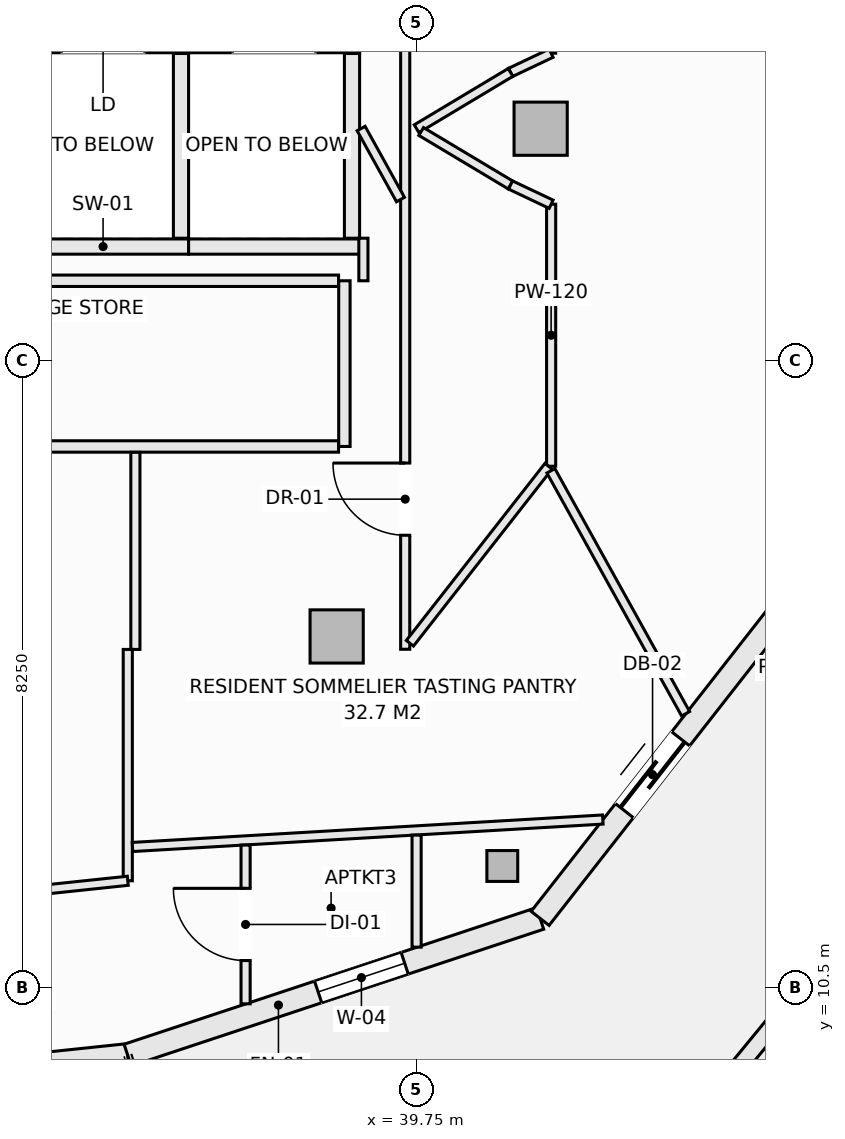
"""IFC4 building model, lengths in metres.
Left out: names, types, materials, properties, quantities, classifications, styles, units other than length and angle.
Written with IfcOpenShell. Run it as: python <this file> out.ifc"""

import sys

from ifc_helpers import new_model, si_unit, direction, frame, frame_2d, origin, origin_2d, place, context, subcontext, project, spatial, rectangle, hollow_rectangle, extrude, element, fill, save


model = new_model("IFC4")
c1 = context("Model", 3, precision=1e-05, world=origin(), true_north=direction((0.0, 1.0)))
c2 = subcontext(c1, "Body", "Model", "MODEL_VIEW")
j1 = project(units=[si_unit("LENGTHUNIT", "METRE"), si_unit("PLANEANGLEUNIT", "RADIAN")], contexts=[c1])
p1 = place(None, origin())
s1 = spatial("IfcSite", under=j1, at=p1, CompositionType="ELEMENT")
p2 = place(p1, origin())
s2 = spatial("IfcBuilding", under=s1, at=p2, CompositionType="ELEMENT")
p3 = place(p2, frame((0.0, 0.0, 242.6)))
s3 = spatial("IfcBuildingStorey", under=s2, at=p3, CompositionType="ELEMENT", Elevation=242.6)
p4 = place(p3, frame((40.878, 12.101, -0.27), z_axis=(0.0, 0.0, 1.0), x_axis=(1.0, 0.0, 0.0)))
e1 = element("IfcColumn", 1, at=p4, inside=s3, PredefinedType="COLUMN", context=c2, shape_type="SweptSolid", body=[
    extrude(hollow_rectangle(XDim=0.406, YDim=0.406, WallThickness=0.016, at=origin_2d()), origin(), (0.0, 0.0, 1.0), 3.3),
])
for number, where, z_axis, x_axis in (
    (2, (38.698, 15.121, -0.27), (0.0, 0.0, 1.0), (1.0, 0.0, 0.0)),
    (3, (41.382, 21.801, -0.27), (0.0, 0.0, 1.0), (1.0, 0.0, 0.0)),
):
    element("IfcColumn", number, at=place(p3, frame(where, z_axis=z_axis, x_axis=x_axis)), inside=s3, PredefinedType="COLUMN", context=c2, shape_type="SweptSolid", body=[
        extrude(rectangle(XDim=0.7, YDim=0.7, at=origin_2d()), origin(), (0.0, 0.0, 1.0), 3.3),
    ])
p5 = place(p3, frame((30.125, 9.0, 0.0), z_axis=(0.0, 0.0, 1.0), x_axis=(0.994500425783, 0.10473253132, 0.0)))
e4 = element("IfcWall", 4, at=p5, inside=s3, PredefinedType="SOLIDWALL", context=c2, shape_type="SweptSolid", body=[
    extrude(rectangle(XDim=5.856, YDim=0.3, at=frame_2d((2.928, 0.0))), origin(), (0.0, 0.0, 1.0), 2.605),
])
p6 = place(p5, frame((1.828, 0.0, 0.72)))
e5 = element("IfcOpeningElement", 5, at=p6, cuts=e4, PredefinedType="OPENING", context=c2, shape_type="SweptSolid", body=[
    extrude(rectangle(XDim=2.2, YDim=1.65, at=frame_2d((1.1, 0.825))), frame((0.0, 0.16, 0.0), z_axis=(0.0, -1.0, 0.0), x_axis=(1.0, 0.0, 0.0)), (0.0, 0.0, 1.0), 0.32),
])
p7 = place(p3, frame((35.948, 9.613, 0.0), z_axis=(0.0, 0.0, 1.0), x_axis=(0.949232769585, 0.314574552605, 0.0)))
e6 = element("IfcWall", 6, at=p7, inside=s3, PredefinedType="SOLIDWALL", context=c2, shape_type="SweptSolid", body=[
    extrude(rectangle(XDim=5.717, YDim=0.3, at=frame_2d((2.858, 0.0))), origin(), (0.0, 0.0, 1.0), 2.605),
])
p8 = place(p7, frame((2.64, 0.0, 0.72)))
e7 = element("IfcOpeningElement", 7, at=p8, cuts=e6, PredefinedType="OPENING", context=c2, shape_type="SweptSolid", body=[
    extrude(rectangle(XDim=1.2, YDim=1.65, at=frame_2d((0.6, 0.825))), frame((0.0, 0.16, 0.0), z_axis=(0.0, -1.0, 0.0), x_axis=(1.0, 0.0, 0.0)), (0.0, 0.0, 1.0), 0.32),
])
p9 = place(p3, frame((41.375, 11.412, 0.0), z_axis=(0.0, 0.0, 1.0), x_axis=(0.61644588519, 0.787397276241, 0.0)))
e8 = element("IfcWall", 8, at=p9, inside=s3, PredefinedType="SOLIDWALL", context=c2, shape_type="SweptSolid", body=[
    extrude(rectangle(XDim=5.357, YDim=0.3, at=frame_2d((2.678, 0.0))), origin(), (0.0, 0.0, 1.0), 2.605),
])
p10 = place(p9, frame((1.8, 0.0, 0.0)))
e9 = element("IfcOpeningElement", 9, at=p10, cuts=e8, PredefinedType="OPENING", context=c2, shape_type="SweptSolid", body=[
    extrude(rectangle(XDim=1.2, YDim=2.2, at=frame_2d((0.6, 1.1))), frame((0.0, 0.16, 0.0), z_axis=(0.0, -1.0, 0.0), x_axis=(1.0, 0.0, 0.0)), (0.0, 0.0, 1.0), 0.32),
])
p11 = place(p3, frame((43.323, 8.646, 0.0), z_axis=(0.0, 0.0, 1.0), x_axis=(0.63407318032, 0.77327304492, 0.0)))
e10 = element("IfcWall", 10, at=p11, inside=s3, PredefinedType="PARAPET", context=c2, shape_type="SweptSolid", body=[
    extrude(rectangle(XDim=6.379, YDim=0.22, at=frame_2d((3.189, 0.0))), origin(), (0.0, 0.0, 1.0), 0.52),
])
p12 = place(p3, frame((34.5, 22.9, 0.0), z_axis=(0.0, 0.0, 1.0), x_axis=(1.0, 0.0, 0.0)))
e11 = element("IfcWall", 11, at=p12, inside=s3, PredefinedType="SOLIDWALL", context=c2, shape_type="SweptSolid", body=[
    extrude(rectangle(XDim=2.25, YDim=0.2, at=frame_2d((1.125, 0.0))), origin(), (0.0, 0.0, 1.0), 3.03),
])
p13 = place(p12, frame((0.575, 0.0, 0.0)))
e12 = element("IfcOpeningElement", 12, at=p13, cuts=e11, PredefinedType="OPENING", context=c2, shape_type="SweptSolid", body=[
    extrude(rectangle(XDim=1.1, YDim=2.2, at=frame_2d((0.55, 1.1))), frame((0.0, 0.11, 0.0), z_axis=(0.0, -1.0, 0.0), x_axis=(1.0, 0.0, 0.0)), (0.0, 0.0, 1.0), 0.22),
])
p14 = place(p3, frame((34.5, 20.25, 0.0), z_axis=(0.0, 0.0, 1.0), x_axis=(1.0, 0.0, 0.0)))
e13 = element("IfcWall", 13, at=p14, inside=s3, PredefinedType="SOLIDWALL", context=c2, shape_type="SweptSolid", body=[
    extrude(rectangle(XDim=2.25, YDim=0.2, at=frame_2d((1.125, 0.0))), origin(), (0.0, 0.0, 1.0), 3.03),
])
p15 = place(p3, frame((36.65, 20.36, 0.0), z_axis=(0.0, 0.0, 1.0), x_axis=(0.0, 1.0, 0.0)))
e14 = element("IfcWall", 14, at=p15, inside=s3, PredefinedType="SOLIDWALL", context=c2, shape_type="SweptSolid", body=[
    extrude(rectangle(XDim=2.43, YDim=0.2, at=frame_2d((1.215, 0.0))), origin(), (0.0, 0.0, 1.0), 3.03),
])
p16 = place(p3, frame((36.75, 22.9, 0.0), z_axis=(0.0, 0.0, 1.0), x_axis=(1.0, 0.0, 0.0)))
e15 = element("IfcWall", 15, at=p16, inside=s3, PredefinedType="SOLIDWALL", context=c2, shape_type="SweptSolid", body=[
    extrude(rectangle(XDim=2.25, YDim=0.2, at=frame_2d((1.125, 0.0))), origin(), (0.0, 0.0, 1.0), 3.03),
])
p17 = place(p16, frame((0.575, 0.0, 0.0)))
e16 = element("IfcOpeningElement", 16, at=p17, cuts=e15, PredefinedType="OPENING", context=c2, shape_type="SweptSolid", body=[
    extrude(rectangle(XDim=1.1, YDim=2.2, at=frame_2d((0.55, 1.1))), frame((0.0, 0.11, 0.0), z_axis=(0.0, -1.0, 0.0), x_axis=(1.0, 0.0, 0.0)), (0.0, 0.0, 1.0), 0.22),
])
p18 = place(p3, frame((36.75, 20.25, 0.0), z_axis=(0.0, 0.0, 1.0), x_axis=(1.0, 0.0, 0.0)))
e17 = element("IfcWall", 17, at=p18, inside=s3, PredefinedType="SOLIDWALL", context=c2, shape_type="SweptSolid", body=[
    extrude(rectangle(XDim=2.25, YDim=0.2, at=frame_2d((1.125, 0.0))), origin(), (0.0, 0.0, 1.0), 3.03),
])
p19 = place(p3, frame((38.9, 20.36, 0.0), z_axis=(0.0, 0.0, 1.0), x_axis=(0.0, 1.0, 0.0)))
e18 = element("IfcWall", 18, at=p19, inside=s3, PredefinedType="SOLIDWALL", context=c2, shape_type="SweptSolid", body=[
    extrude(rectangle(XDim=2.43, YDim=0.2, at=frame_2d((1.215, 0.0))), origin(), (0.0, 0.0, 1.0), 3.03),
])
p20 = place(p3, frame((38.8, 17.62, 0.0), z_axis=(0.0, 0.0, 1.0), x_axis=(0.0, 1.0, 0.0)))
e19 = element("IfcWall", 19, at=p20, inside=s3, PredefinedType="PARTITIONING", context=c2, shape_type="SweptSolid", body=[
    extrude(rectangle(XDim=2.18, YDim=0.15, at=frame_2d((1.09, 0.0))), origin(), (0.0, 0.0, 1.0), 3.03),
])
p21 = place(p3, frame((30.077, 17.62, 0.0), z_axis=(0.0, 0.0, 1.0), x_axis=(1.0, 0.0, 0.0)))
e20 = element("IfcWall", 20, at=p21, inside=s3, PredefinedType="PARTITIONING", context=c2, shape_type="SweptSolid", body=[
    extrude(rectangle(XDim=8.646, YDim=0.15, at=frame_2d((4.323, 0.0))), origin(), (0.0, 0.0, 1.0), 3.03),
])
p22 = place(p21, frame((2.717, 0.0, 0.0)))
e21 = element("IfcOpeningElement", 21, at=p22, cuts=e20, PredefinedType="OPENING", context=c2, shape_type="SweptSolid", body=[
    extrude(rectangle(XDim=0.95, YDim=2.1, at=frame_2d((0.475, 1.05))), frame((0.0, 0.085, 0.0), z_axis=(0.0, -1.0, 0.0), x_axis=(1.0, 0.0, 0.0)), (0.0, 0.0, 1.0), 0.17),
])
p23 = place(p3, frame((30.077, 19.8, 0.0), z_axis=(0.0, 0.0, 1.0), x_axis=(1.0, 0.0, 0.0)))
e22 = element("IfcWall", 22, at=p23, inside=s3, PredefinedType="PARTITIONING", context=c2, shape_type="SweptSolid", body=[
    extrude(rectangle(XDim=8.646, YDim=0.15, at=frame_2d((4.323, 0.0))), origin(), (0.0, 0.0, 1.0), 3.03),
])
p24 = place(p3, frame((39.05, 19.8, 0.0), z_axis=(0.0, 0.0, 1.0), x_axis=(0.0, 1.0, 0.0)))
e23 = element("IfcWall", 23, at=p24, inside=s3, PredefinedType="PARTITIONING", context=c2, shape_type="SweptSolid", body=[
    extrude(rectangle(XDim=0.56, YDim=0.12, at=frame_2d((0.28, 0.0))), origin(), (0.0, 0.0, 1.0), 3.03),
])
p25 = place(p3, frame((39.6, 14.952, 0.0), z_axis=(0.0, 0.0, 1.0), x_axis=(0.0, 1.0, 0.0)))
e24 = element("IfcWall", 24, at=p25, inside=s3, PredefinedType="PARTITIONING", context=c2, shape_type="SweptSolid", body=[
    extrude(rectangle(XDim=8.068, YDim=0.12, at=frame_2d((4.034, 0.0))), origin(), (0.0, 0.0, 1.0), 2.478),
])
p26 = place(p25, frame((1.5, 0.0, 0.0)))
e25 = element("IfcOpeningElement", 25, at=p26, cuts=e24, PredefinedType="OPENING", context=c2, shape_type="SweptSolid", body=[
    extrude(rectangle(XDim=0.95, YDim=2.1, at=frame_2d((0.475, 1.05))), frame((0.0, 0.07, 0.0), z_axis=(0.0, -1.0, 0.0), x_axis=(1.0, 0.0, 0.0)), (0.0, 0.0, 1.0), 0.14),
])
p27 = place(p3, frame((41.52, 17.36, 0.0), z_axis=(0.0, 0.0, 1.0), x_axis=(0.0, 1.0, 0.0)))
e26 = element("IfcWall", 26, at=p27, inside=s3, PredefinedType="PARTITIONING", context=c2, shape_type="SweptSolid", body=[
    extrude(rectangle(XDim=3.447, YDim=0.12, at=frame_2d((1.723, 0.0))), origin(), (0.0, 0.0, 1.0), 3.03),
])
p28 = place(p3, frame((41.52, 22.794, 0.0), z_axis=(0.0, 0.0, 1.0), x_axis=(0.0, 1.0, 0.0)))
e27 = element("IfcWall", 27, at=p28, inside=s3, PredefinedType="PARTITIONING", context=c2, shape_type="SweptSolid", body=[
    extrude(rectangle(XDim=8.412, YDim=0.12, at=frame_2d((4.206, 0.0))), origin(), (0.0, 0.0, 1.0), 2.478),
])
p29 = place(p28, frame((1.999, 0.0, 0.0)))
e28 = element("IfcOpeningElement", 28, at=p29, cuts=e27, PredefinedType="OPENING", context=c2, shape_type="SweptSolid", body=[
    extrude(rectangle(XDim=0.95, YDim=2.1, at=frame_2d((0.475, 1.05))), frame((0.0, 0.07, 0.0), z_axis=(0.0, -1.0, 0.0), x_axis=(1.0, 0.0, 0.0)), (0.0, 0.0, 1.0), 0.14),
])
p30 = place(p3, frame((40.986, 22.541, 0.0), z_axis=(0.0, 0.0, 1.0), x_axis=(0.903729424576, 0.428104107847, 0.0)))
e29 = element("IfcWall", 29, at=p30, inside=s3, PredefinedType="PARTITIONING", context=c2, shape_type="SweptSolid", body=[
    extrude(rectangle(XDim=0.591, YDim=0.12, at=frame_2d((0.295, 0.0))), origin(), (0.0, 0.0, 1.0), 3.03),
])
p31 = place(p3, frame((39.75, 21.8, 0.0), z_axis=(0.0, 0.0, 1.0), x_axis=(0.857702120906, 0.514146935996, 0.0)))
e30 = element("IfcWall", 30, at=p31, inside=s3, PredefinedType="PARTITIONING", context=c2, shape_type="SweptSolid", body=[
    extrude(rectangle(XDim=1.441, YDim=0.12, at=frame_2d((0.721, 0.0))), origin(), (0.0, 0.0, 1.0), 3.03),
])
p32 = place(p3, frame((39.81, 21.764, 0.0), z_axis=(0.0, 0.0, 1.0), x_axis=(0.858011245414, -0.513630901273, 0.0)))
e31 = element("IfcWall", 31, at=p32, inside=s3, PredefinedType="PARTITIONING", context=c2, shape_type="SweptSolid", body=[
    extrude(rectangle(XDim=1.37, YDim=0.12, at=frame_2d((0.685, 0.0))), origin(), (0.0, 0.0, 1.0), 3.03),
])
p33 = place(p3, frame((40.986, 21.06, 0.0), z_axis=(0.0, 0.0, 1.0), x_axis=(0.90356951601, -0.428441512621, 0.0)))
e32 = element("IfcWall", 32, at=p33, inside=s3, PredefinedType="PARTITIONING", context=c2, shape_type="SweptSolid", body=[
    extrude(rectangle(XDim=0.591, YDim=0.12, at=frame_2d((0.295, 0.0))), origin(), (0.0, 0.0, 1.0), 3.03),
])
p34 = place(p3, frame((39.662, 15.031, 0.0), z_axis=(0.0, 0.0, 1.0), x_axis=(0.616497420092, 0.787356927334, 0.0)))
e33 = element("IfcWall", 33, at=p34, inside=s3, PredefinedType="PARTITIONING", context=c2, shape_type="SweptSolid", body=[
    extrude(rectangle(XDim=2.958, YDim=0.12, at=frame_2d((1.479, 0.0))), origin(), (0.0, 0.0, 1.0), 3.03),
])
p35 = place(p3, frame((36.05, 14.95, 0.0), z_axis=(0.0, 0.0, 1.0), x_axis=(0.0, 1.0, 0.0)))
e34 = element("IfcWall", 34, at=p35, inside=s3, PredefinedType="PARTITIONING", context=c2, shape_type="SweptSolid", body=[
    extrude(rectangle(XDim=2.593, YDim=0.12, at=frame_2d((1.296, 0.0))), origin(), (0.0, 0.0, 1.0), 3.03),
])
p36 = place(p3, frame((35.95, 11.906, 0.0), z_axis=(0.0, 0.0, 1.0), x_axis=(0.0, 1.0, 0.0)))
e35 = element("IfcWall", 35, at=p36, inside=s3, PredefinedType="PARTITIONING", context=c2, shape_type="SweptSolid", body=[
    extrude(rectangle(XDim=3.044, YDim=0.12, at=frame_2d((1.522, 0.0))), origin(), (0.0, 0.0, 1.0), 3.03),
])
p37 = place(p3, frame((34.468, 11.75, 0.0), z_axis=(0.0, 0.0, 1.0), x_axis=(0.994504555135, 0.104693313135, 0.0)))
e36 = element("IfcWall", 36, at=p37, inside=s3, PredefinedType="PARTITIONING", context=c2, shape_type="SweptSolid", body=[
    extrude(rectangle(XDim=1.49, YDim=0.12, at=frame_2d((0.745, 0.0))), origin(), (0.0, 0.0, 1.0), 3.03),
])
p38 = place(p3, frame((36.012, 12.351, 0.0), z_axis=(0.0, 0.0, 1.0), x_axis=(0.998301967663, 0.058251020246, 0.0)))
e37 = element("IfcWall", 37, at=p38, inside=s3, PredefinedType="PARTITIONING", context=c2, shape_type="SweptSolid", body=[
    extrude(rectangle(XDim=6.199, YDim=0.12, at=frame_2d((3.099, 0.0))), origin(), (0.0, 0.0, 1.0), 2.605),
])
p39 = place(p3, frame((37.5, 10.288, 0.0), z_axis=(0.0, 0.0, 1.0), x_axis=(0.0, 1.0, 0.0)))
e38 = element("IfcWall", 38, at=p39, inside=s3, PredefinedType="PARTITIONING", context=c2, shape_type="SweptSolid", body=[
    extrude(rectangle(XDim=2.088, YDim=0.12, at=frame_2d((1.044, 0.0))), origin(), (0.0, 0.0, 1.0), 3.03),
])
p40 = place(p39, frame((0.569, 0.0, 0.0)))
e39 = element("IfcOpeningElement", 39, at=p40, cuts=e38, PredefinedType="OPENING", context=c2, shape_type="SweptSolid", body=[
    extrude(rectangle(XDim=0.95, YDim=2.1, at=frame_2d((0.475, 1.05))), frame((0.0, 0.07, 0.0), z_axis=(0.0, -1.0, 0.0), x_axis=(1.0, 0.0, 0.0)), (0.0, 0.0, 1.0), 0.14),
])
p41 = place(p3, frame((39.75, 11.033, 0.0), z_axis=(0.0, 0.0, 1.0), x_axis=(0.0, 1.0, 0.0)))
e40 = element("IfcWall", 40, at=p41, inside=s3, PredefinedType="PARTITIONING", context=c2, shape_type="SweptSolid", body=[
    extrude(rectangle(XDim=1.474, YDim=0.12, at=frame_2d((0.737, 0.0))), origin(), (0.0, 0.0, 1.0), 3.03),
])
p42 = place(p3, frame((39.02, 21.803, 0.0), z_axis=(0.0, 0.0, 1.0), x_axis=(0.485021793049, -0.874502064187, 0.0)))
e41 = element("IfcWall", 41, at=p42, inside=s3, PredefinedType="PARTITIONING", context=c2, shape_type="SweptSolid", body=[
    extrude(rectangle(XDim=1.068, YDim=0.12, at=frame_2d((0.534, 0.0))), origin(), (0.0, 0.0, 1.0), 3.03),
])
p43 = place(p3, frame((41.517, 17.3, 0.0), z_axis=(0.0, 0.0, 1.0), x_axis=(0.484911097078, -0.874563449917, 0.0)))
e42 = element("IfcWall", 42, at=p43, inside=s3, PredefinedType="PARTITIONING", context=c2, shape_type="SweptSolid", body=[
    extrude(rectangle(XDim=3.655, YDim=0.12, at=frame_2d((1.827, 0.0))), origin(), (0.0, 0.0, 1.0), 2.77),
])
p44 = place(p8, origin())
e43 = element("IfcWindow", 43, at=p44, inside=s3, PartitioningType="SINGLE_PANEL", PredefinedType="WINDOW", context=c2, shape_type="SweptSolid", body=[
    extrude(rectangle(XDim=1.2, YDim=1.65, at=frame_2d((0.6, 0.825))), frame((0.0, 0.03, 0.0), z_axis=(0.0, -1.0, 0.0), x_axis=(1.0, 0.0, 0.0)), (0.0, 0.0, 1.0), 0.06),
])
fill(e7, e43)
p45 = place(p10, frame((1.2, 0.0, 0.0), z_axis=(0.0, 0.0, 1.0), x_axis=(-1.0, 0.0, 0.0)))
e44 = element("IfcDoor", 44, at=p45, inside=s3, OperationType="SLIDING_TO_LEFT", PredefinedType="DOOR", context=c2, shape_type="SweptSolid", body=[
    extrude(rectangle(XDim=1.2, YDim=2.2, at=frame_2d((0.6, 1.1))), frame((0.0, 0.025, 0.0), z_axis=(0.0, -1.0, 0.0), x_axis=(1.0, 0.0, 0.0)), (0.0, 0.0, 1.0), 0.05),
])
fill(e9, e44)
p46 = place(p26, origin())
e45 = element("IfcDoor", 45, at=p46, inside=s3, OperationType="SINGLE_SWING_RIGHT", PredefinedType="DOOR", context=c2, shape_type="SweptSolid", body=[
    extrude(rectangle(XDim=0.95, YDim=2.1, at=frame_2d((0.475, 1.05))), frame((0.0, 0.025, 0.0), z_axis=(0.0, -1.0, 0.0), x_axis=(1.0, 0.0, 0.0)), (0.0, 0.0, 1.0), 0.05),
])
fill(e25, e45)
p47 = place(p40, origin())
e46 = element("IfcDoor", 46, at=p47, inside=s3, OperationType="SINGLE_SWING_RIGHT", PredefinedType="DOOR", context=c2, shape_type="SweptSolid", body=[
    extrude(rectangle(XDim=0.95, YDim=2.1, at=frame_2d((0.475, 1.05))), frame((0.0, 0.025, 0.0), z_axis=(0.0, -1.0, 0.0), x_axis=(1.0, 0.0, 0.0)), (0.0, 0.0, 1.0), 0.05),
])
fill(e39, e46)
save(model, sys.argv[1])
